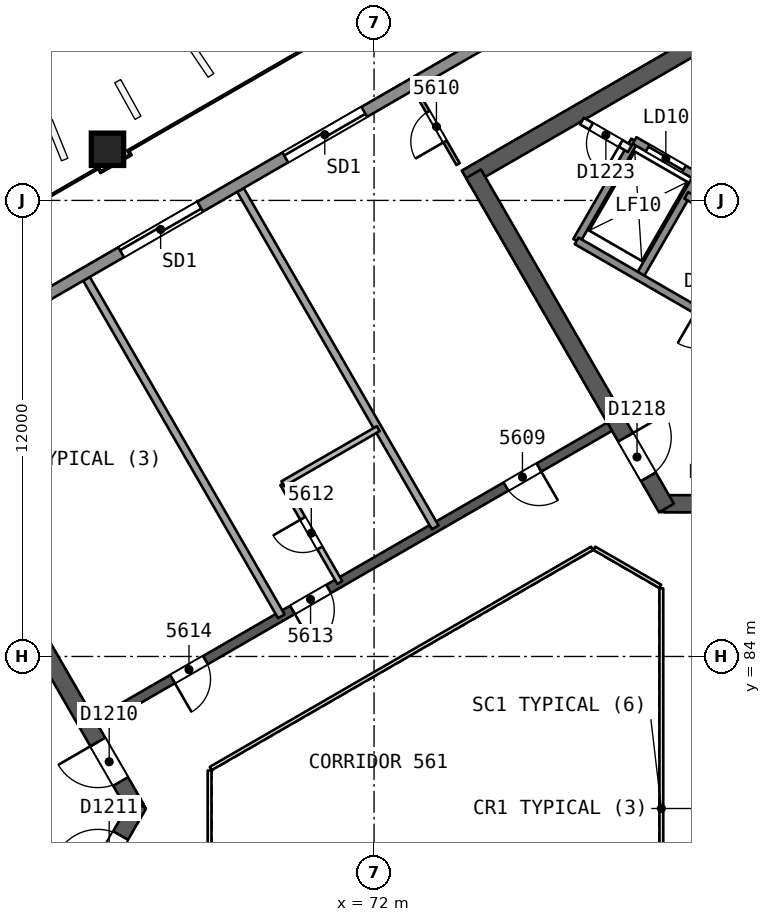
"""IFC4 building model, lengths in metres.
Left out: names, types, materials, properties, quantities, classifications, styles, units other than length and angle.
Written with IfcOpenShell. Run it as: python <this file> out.ifc"""

import sys

from ifc_helpers import new_model, si_unit, direction, frame, frame_2d, origin, origin_2d, place, context, subcontext, project, spatial, rectangle, extrude, element, fill, save


model = new_model("IFC4")
c1 = context("Model", 3, precision=1e-05, world=origin(), true_north=direction((0.0, 1.0)))
c2 = subcontext(c1, "Body", "Model", "MODEL_VIEW")
j1 = project(units=[si_unit("LENGTHUNIT", "METRE"), si_unit("PLANEANGLEUNIT", "RADIAN")], contexts=[c1])
p1 = place(None, origin())
s1 = spatial("IfcSite", under=j1, at=p1, CompositionType="ELEMENT")
p2 = place(p1, origin())
s2 = spatial("IfcBuilding", under=s1, at=p2, CompositionType="ELEMENT")
p3 = place(p2, frame((0.0, 0.0, 228.0)))
s3 = spatial("IfcBuildingStorey", under=s2, at=p3, CompositionType="ELEMENT", Elevation=228.0)
p4 = place(p3, frame((65.74, 80.0, 0.0), z_axis=(0.0, 0.0, 1.0), x_axis=(-0.499991857942, 0.866030104553, 0.0)))
e1 = element("IfcWall", 1, at=p4, inside=s3, PredefinedType="SHEAR", context=c2, shape_type="SweptSolid", body=[
    extrude(rectangle(XDim=10.25, YDim=0.45, at=frame_2d((5.125, 0.0))), origin(), (0.0, 0.0, 1.0), 3.7),
])
p5 = place(p4, frame((0.82, 0.0, 0.0)))
e2 = element("IfcOpeningElement", 2, at=p5, cuts=e1, PredefinedType="OPENING", context=c2, shape_type="SweptSolid", body=[
    extrude(rectangle(XDim=1.2, YDim=2.1, at=frame_2d((0.6, 1.05))), frame((0.0, 0.235, 0.0), z_axis=(0.0, -1.0, 0.0), x_axis=(1.0, 0.0, 0.0)), (0.0, 0.0, 1.0), 0.471),
])
p6 = place(p3, frame((60.728, 71.318, 0.0), z_axis=(0.0, 0.0, 1.0), x_axis=(0.500012416173, 0.866018235185, 0.0)))
e3 = element("IfcWall", 3, at=p6, inside=s3, PredefinedType="SHEAR", context=c2, shape_type="SweptSolid", body=[
    extrude(rectangle(XDim=10.155, YDim=0.45, at=frame_2d((5.078, 0.0))), origin(), (0.0, 0.0, 1.0), 3.7),
])
p7 = place(p6, frame((8.005, 0.0, 0.0)))
e4 = element("IfcOpeningElement", 4, at=p7, cuts=e3, PredefinedType="OPENING", context=c2, shape_type="SweptSolid", body=[
    extrude(rectangle(XDim=1.2, YDim=2.1, at=frame_2d((0.6, 1.05))), frame((0.0, 0.235, 0.0), z_axis=(0.0, -1.0, 0.0), x_axis=(1.0, 0.0, 0.0)), (0.0, 0.0, 1.0), 0.471),
])
p8 = place(p3, frame((79.63, 88.019, 0.0), z_axis=(0.0, 0.0, 1.0), x_axis=(1.0, 0.0, 0.0)))
e5 = element("IfcWall", 5, at=p8, inside=s3, PredefinedType="SHEAR", context=c2, shape_type="SweptSolid", body=[
    extrude(rectangle(XDim=10.25, YDim=0.45, at=frame_2d((5.125, 0.0))), origin(), (0.0, 0.0, 1.0), 3.7),
])
p9 = place(p8, frame((0.82, 0.0, 0.0)))
e6 = element("IfcOpeningElement", 6, at=p9, cuts=e5, PredefinedType="OPENING", context=c2, shape_type="SweptSolid", body=[
    extrude(rectangle(XDim=1.2, YDim=2.1, at=frame_2d((0.6, 1.05))), frame((0.0, 0.235, 0.0), z_axis=(0.0, -1.0, 0.0), x_axis=(1.0, 0.0, 0.0)), (0.0, 0.0, 1.0), 0.471),
])
p10 = place(p3, frame((86.723, 103.69, 0.0), z_axis=(0.0, 0.0, 1.0), x_axis=(-0.866022713978, -0.500004658852, 0.0)))
e7 = element("IfcWall", 7, at=p10, inside=s3, PredefinedType="SHEAR", context=c2, shape_type="SweptSolid", body=[
    extrude(rectangle(XDim=14.203, YDim=0.45, at=frame_2d((7.102, 0.0))), origin(), (0.0, 0.0, 1.0), 3.7),
])
p11 = place(p3, frame((74.617, 96.701, 0.0), z_axis=(0.0, 0.0, 1.0), x_axis=(0.499994385119, -0.866028645513, 0.0)))
e8 = element("IfcWall", 8, at=p11, inside=s3, PredefinedType="SHEAR", context=c2, shape_type="SweptSolid", body=[
    extrude(rectangle(XDim=10.155, YDim=0.45, at=frame_2d((5.077, 0.0))), origin(), (0.0, 0.0, 1.0), 3.7),
])
p12 = place(p11, frame((8.005, 0.0, 0.0)))
e9 = element("IfcOpeningElement", 9, at=p12, cuts=e8, PredefinedType="OPENING", context=c2, shape_type="SweptSolid", body=[
    extrude(rectangle(XDim=1.2, YDim=2.1, at=frame_2d((0.6, 1.05))), frame((0.0, 0.235, 0.0), z_axis=(0.0, -1.0, 0.0), x_axis=(1.0, 0.0, 0.0)), (0.0, 0.0, 1.0), 0.471),
])
p13 = place(p3, frame((78.2, 90.046, 0.0), z_axis=(0.0, 0.0, 1.0), x_axis=(-0.866026492143, -0.499998114903, 0.0)))
e10 = element("IfcWall", 10, at=p13, inside=s3, PredefinedType="SHEAR", context=c2, shape_type="SweptSolid", body=[
    extrude(rectangle(XDim=15.588, YDim=0.25, at=frame_2d((7.794, 0.0))), origin(), (0.0, 0.0, 1.0), 3.3),
])
p14 = place(p13, frame((2.15, 0.0, 0.0)))
e11 = element("IfcOpeningElement", 11, at=p14, cuts=e10, PredefinedType="OPENING", context=c2, shape_type="SweptSolid", body=[
    extrude(rectangle(XDim=1.0, YDim=2.1, at=frame_2d((0.5, 1.05))), frame((0.0, 0.135, 0.0), z_axis=(0.0, -1.0, 0.0), x_axis=(1.0, 0.0, 0.0)), (0.0, 0.0, 1.0), 0.271),
])
p15 = place(p13, frame((8.538, 0.0, 0.0)))
e12 = element("IfcOpeningElement", 12, at=p15, cuts=e10, PredefinedType="OPENING", context=c2, shape_type="SweptSolid", body=[
    extrude(rectangle(XDim=1.1, YDim=2.1, at=frame_2d((0.55, 1.05))), frame((0.0, 0.135, 0.0), z_axis=(0.0, -1.0, 0.0), x_axis=(1.0, 0.0, 0.0)), (0.0, 0.0, 1.0), 0.271),
])
p16 = place(p13, frame((12.282, 0.0, 0.0)))
e13 = element("IfcOpeningElement", 13, at=p16, cuts=e10, PredefinedType="OPENING", context=c2, shape_type="SweptSolid", body=[
    extrude(rectangle(XDim=1.0, YDim=2.1, at=frame_2d((0.5, 1.05))), frame((0.0, 0.135, 0.0), z_axis=(0.0, -1.0, 0.0), x_axis=(1.0, 0.0, 0.0)), (0.0, 0.0, 1.0), 0.271),
])
p17 = place(p3, frame((64.974, 97.366, 0.0), z_axis=(0.010093620709, -0.017482414954, 0.999796221231), x_axis=(-0.499891296978, 0.865852860014, 0.020187025823)))
e14 = element("IfcColumn", 14, at=p17, inside=s3, PredefinedType="COLUMN", context=c2, shape_type="SweptSolid", body=[
    extrude(rectangle(XDim=0.85, YDim=0.85, at=origin_2d()), origin(), (0.0, 0.0, 1.0), 3.701),
])
p18 = place(p3, frame((74.21, 96.956, 0.0), z_axis=(0.0, 0.0, 1.0), x_axis=(-0.499948534732, 0.866055115232, 0.0)))
e15 = element("IfcWall", 15, at=p18, inside=s3, PredefinedType="PARTITIONING", context=c2, shape_type="SweptSolid", body=[
    extrude(rectangle(XDim=2.275, YDim=0.1, at=frame_2d((1.137, 0.0))), origin(), (0.0, 0.0, 1.0), 3.3),
])
p19 = place(p18, frame((0.687, 0.0, 0.0)))
e16 = element("IfcOpeningElement", 16, at=p19, cuts=e15, PredefinedType="OPENING", context=c2, shape_type="SweptSolid", body=[
    extrude(rectangle(XDim=0.9, YDim=2.1, at=frame_2d((0.45, 1.05))), frame((0.0, 0.061, 0.0), z_axis=(0.0, -1.0, 0.0), x_axis=(1.0, 0.0, 0.0)), (0.0, 0.0, 1.0), 0.121),
])
p20 = place(p3, frame((68.483, 96.276, 0.0), z_axis=(0.0, 0.0, 1.0), x_axis=(0.500011000363, -0.866019052629, 0.0)))
e17 = element("IfcWall", 17, at=p20, inside=s3, PredefinedType="PARTITIONING", context=c2, shape_type="SweptSolid", body=[
    extrude(rectangle(XDim=10.254, YDim=0.2, at=frame_2d((5.127, 0.0))), origin(), (0.0, 0.0, 1.0), 3.3),
])
p21 = place(p3, frame((71.099, 85.946, 0.0), z_axis=(0.0, 0.0, 1.0), x_axis=(-0.499990139034, 0.866031096941, 0.0)))
e18 = element("IfcWall", 18, at=p21, inside=s3, PredefinedType="PARTITIONING", context=c2, shape_type="SweptSolid", body=[
    extrude(rectangle(XDim=3.0, YDim=0.15, at=frame_2d((1.5, 0.0))), origin(), (0.0, 0.0, 1.0), 3.3),
])
p22 = place(p21, frame((1.05, 0.0, 0.0)))
e19 = element("IfcOpeningElement", 19, at=p22, cuts=e18, PredefinedType="OPENING", context=c2, shape_type="SweptSolid", body=[
    extrude(rectangle(XDim=0.9, YDim=2.1, at=frame_2d((0.45, 1.05))), frame((0.0, 0.085, 0.0), z_axis=(0.0, -1.0, 0.0), x_axis=(1.0, 0.0, 0.0)), (0.0, 0.0, 1.0), 0.171),
])
p23 = place(p3, frame((69.599, 88.544, 0.0), z_axis=(0.0, 0.0, 1.0), x_axis=(0.866032775405, 0.499987231761, 0.0)))
e20 = element("IfcWall", 20, at=p23, inside=s3, PredefinedType="PARTITIONING", context=c2, shape_type="SweptSolid", body=[
    extrude(rectangle(XDim=2.9, YDim=0.15, at=frame_2d((1.45, 0.0))), origin(), (0.0, 0.0, 1.0), 3.3),
])
p24 = place(p3, frame((64.433, 93.938, 0.0), z_axis=(0.0, 0.0, 1.0), x_axis=(0.500011000363, -0.866019052629, 0.0)))
e21 = element("IfcWall", 21, at=p24, inside=s3, PredefinedType="PARTITIONING", context=c2, shape_type="SweptSolid", body=[
    extrude(rectangle(XDim=10.254, YDim=0.2, at=frame_2d((5.127, 0.0))), origin(), (0.0, 0.0, 1.0), 3.3),
])
p25 = place(p3, frame((44.454, 82.574, 0.0), z_axis=(0.0, 0.0, 1.0), x_axis=(0.86602387423, 0.500002649256, 0.0)))
e22 = element("IfcWall", 22, at=p25, inside=s3, PredefinedType="SOLIDWALL", context=c2, shape_type="SweptSolid", body=[
    extrude(rectangle(XDim=50.333, YDim=0.3, at=frame_2d((25.167, 0.0))), origin(), (0.0, 0.0, 1.0), 3.3),
])
p26 = place(p25, frame((24.122, 0.0, 0.0)))
e23 = element("IfcOpeningElement", 23, at=p26, cuts=e22, PredefinedType="OPENING", context=c2, shape_type="SweptSolid", body=[
    extrude(rectangle(XDim=2.4, YDim=2.4, at=frame_2d((1.2, 1.2))), frame((0.0, 0.161, 0.0), z_axis=(0.0, -1.0, 0.0), x_axis=(1.0, 0.0, 0.0)), (0.0, 0.0, 1.0), 0.321),
])
p27 = place(p25, frame((29.111, 0.0, 0.0)))
e24 = element("IfcOpeningElement", 24, at=p27, cuts=e22, PredefinedType="OPENING", context=c2, shape_type="SweptSolid", body=[
    extrude(rectangle(XDim=2.4, YDim=2.4, at=frame_2d((1.2, 1.2))), frame((0.0, 0.161, 0.0), z_axis=(0.0, -1.0, 0.0), x_axis=(1.0, 0.0, 0.0)), (0.0, 0.0, 1.0), 0.321),
])
p28 = place(p25, frame((39.164, 0.0, 0.0)))
e25 = element("IfcOpeningElement", 25, at=p28, cuts=e22, PredefinedType="OPENING", context=c2, shape_type="SweptSolid", body=[
    extrude(rectangle(XDim=2.4, YDim=2.4, at=frame_2d((1.2, 1.2))), frame((0.0, 0.161, 0.0), z_axis=(0.0, -1.0, 0.0), x_axis=(1.0, 0.0, 0.0)), (0.0, 0.0, 1.0), 0.321),
])
p29 = place(p25, frame((18.978, 0.0, 0.0)))
e26 = element("IfcOpeningElement", 26, at=p29, cuts=e22, PredefinedType="OPENING", context=c2, shape_type="SweptSolid", body=[
    extrude(rectangle(XDim=2.4, YDim=2.4, at=frame_2d((1.2, 1.2))), frame((0.0, 0.161, 0.0), z_axis=(0.0, -1.0, 0.0), x_axis=(1.0, 0.0, 0.0)), (0.0, 0.0, 1.0), 0.321),
])
p30 = place(p25, frame((8.763, 0.0, 0.0)))
e27 = element("IfcOpeningElement", 27, at=p30, cuts=e22, PredefinedType="OPENING", context=c2, shape_type="SweptSolid", body=[
    extrude(rectangle(XDim=2.4, YDim=2.4, at=frame_2d((1.2, 1.2))), frame((0.0, 0.161, 0.0), z_axis=(0.0, -1.0, 0.0), x_axis=(1.0, 0.0, 0.0)), (0.0, 0.0, 1.0), 0.321),
])
for number, where, z_axis, x_axis in (
    (28, (78.976, 93.986, 0.0), (0.0, 0.0, 1.0), (0.5, 0.866, 0.0)),
    (29, (77.33, 94.936, 0.0), (0.0, 0.0, 1.0), (0.5, 0.866, 0.0)),
):
    element("IfcWall", number, at=place(p3, frame(where, z_axis=z_axis, x_axis=x_axis)), inside=s3, PredefinedType="SOLIDWALL", context=c2, shape_type="SweptSolid", body=[
        extrude(rectangle(XDim=3.05, YDim=0.2, at=frame_2d((1.525, 0.0))), origin(), (0.0, 0.0, 1.0), 3.3),
    ])
p31 = place(p3, frame((86.77, 89.486, 0.0), z_axis=(0.0, 0.0, 1.0), x_axis=(-0.86601811187, 0.500012629753, 0.0)))
e30 = element("IfcWall", 30, at=p31, inside=s3, PredefinedType="SOLIDWALL", context=c2, shape_type="SweptSolid", body=[
    extrude(rectangle(XDim=10.9, YDim=0.2, at=frame_2d((5.45, 0.0))), origin(), (0.0, 0.0, 1.0), 3.3),
])
p32 = place(p31, frame((0.625, 0.0, 0.0)))
e31 = element("IfcOpeningElement", 31, at=p32, cuts=e30, PredefinedType="OPENING", context=c2, shape_type="SweptSolid", body=[
    extrude(rectangle(XDim=1.0, YDim=2.1, at=frame_2d((0.5, 1.05))), frame((0.0, 0.11, 0.0), z_axis=(0.0, -1.0, 0.0), x_axis=(1.0, 0.0, 0.0)), (0.0, 0.0, 1.0), 0.221),
])
p33 = place(p31, frame((2.875, 0.0, 0.0)))
e32 = element("IfcOpeningElement", 32, at=p33, cuts=e30, PredefinedType="OPENING", context=c2, shape_type="SweptSolid", body=[
    extrude(rectangle(XDim=1.0, YDim=2.1, at=frame_2d((0.5, 1.05))), frame((0.0, 0.11, 0.0), z_axis=(0.0, -1.0, 0.0), x_axis=(1.0, 0.0, 0.0)), (0.0, 0.0, 1.0), 0.221),
])
p34 = place(p31, frame((6.25, 0.0, 0.0)))
e33 = element("IfcOpeningElement", 33, at=p34, cuts=e30, PredefinedType="OPENING", context=c2, shape_type="SweptSolid", body=[
    extrude(rectangle(XDim=1.0, YDim=2.1, at=frame_2d((0.5, 1.05))), frame((0.0, 0.11, 0.0), z_axis=(0.0, -1.0, 0.0), x_axis=(1.0, 0.0, 0.0)), (0.0, 0.0, 1.0), 0.221),
])
p35 = place(p3, frame((89.43, 90.814, 0.0), z_axis=(0.0, 0.0, 1.0), x_axis=(-0.866018983788, 0.500011119594, 0.0)))
e34 = element("IfcWall", 34, at=p35, inside=s3, PredefinedType="SOLIDWALL", context=c2, shape_type="SweptSolid", body=[
    extrude(rectangle(XDim=10.64, YDim=0.2, at=frame_2d((5.32, 0.0))), origin(), (0.0, 0.0, 1.0), 3.3),
])
p36 = place(p35, frame((0.37, 0.0, 0.0)))
e35 = element("IfcOpeningElement", 35, at=p36, cuts=e34, PredefinedType="OPENING", context=c2, shape_type="SweptSolid", body=[
    extrude(rectangle(XDim=0.9, YDim=2.1, at=frame_2d((0.45, 1.05))), frame((0.0, 0.11, 0.0), z_axis=(0.0, -1.0, 0.0), x_axis=(1.0, 0.0, 0.0)), (0.0, 0.0, 1.0), 0.221),
])
p37 = place(p3, frame((78.73, 97.361, 0.0), z_axis=(0.0, 0.0, 1.0), x_axis=(-0.866045896294, 0.499964504253, 0.0)))
e36 = element("IfcWall", 36, at=p37, inside=s3, PredefinedType="PARTITIONING", context=c2, shape_type="SweptSolid", body=[
    extrude(rectangle(XDim=1.455, YDim=0.2, at=frame_2d((0.728, 0.0))), origin(), (0.0, 0.0, 1.0), 3.3),
])
p38 = place(p37, frame((0.278, 0.0, 0.0)))
e37 = element("IfcOpeningElement", 37, at=p38, cuts=e36, PredefinedType="OPENING", context=c2, shape_type="SweptSolid", body=[
    extrude(rectangle(XDim=0.9, YDim=2.1, at=frame_2d((0.45, 1.05))), frame((0.0, 0.11, 0.0), z_axis=(0.0, -1.0, 0.0), x_axis=(1.0, 0.0, 0.0)), (0.0, 0.0, 1.0), 0.221),
])
p39 = place(p3, frame((80.5, 96.627, 0.0), z_axis=(0.0, 0.0, 1.0), x_axis=(-0.86601224135, 0.500022797313, 0.0)))
e38 = element("IfcWall", 38, at=p39, inside=s3, PredefinedType="SOLIDWALL", context=c2, shape_type="SweptSolid", body=[
    extrude(rectangle(XDim=1.9, YDim=0.2, at=frame_2d((0.95, 0.0))), origin(), (0.0, 0.0, 1.0), 3.3),
])
p40 = place(p39, frame((0.4, 0.0, 0.0)))
e39 = element("IfcOpeningElement", 39, at=p40, cuts=e38, PredefinedType="OPENING", context=c2, shape_type="SweptSolid", body=[
    extrude(rectangle(XDim=1.1, YDim=2.1, at=frame_2d((0.55, 1.05))), frame((0.0, 0.11, 0.0), z_axis=(0.0, -1.0, 0.0), x_axis=(1.0, 0.0, 0.0)), (0.0, 0.0, 1.0), 0.221),
])
p41 = place(p3, frame((79.56, 74.206, 0.0), z_axis=(0.0, 0.0, 1.0), x_axis=(0.0, 1.0, 0.0)))
e40 = element("IfcWall", 40, at=p41, inside=s3, PredefinedType="PARTITIONING", context=c2, shape_type="SweptSolid", body=[
    extrude(rectangle(XDim=11.588, YDim=0.1, at=frame_2d((5.794, 0.0))), origin(), (0.0, 0.0, 1.0), 3.3),
])
p42 = place(p3, frame((79.53, 85.846, 0.0), z_axis=(0.0, 0.0, 1.0), x_axis=(-0.866041268327, 0.499972520799, 0.0)))
e41 = element("IfcWall", 41, at=p42, inside=s3, PredefinedType="PARTITIONING", context=c2, shape_type="SweptSolid", body=[
    extrude(rectangle(XDim=2.0, YDim=0.1, at=frame_2d((1.0, 0.0))), origin(), (0.0, 0.0, 1.0), 3.3),
])
p43 = place(p3, frame((77.738, 86.846, 0.0), z_axis=(0.0, 0.0, 1.0), x_axis=(-0.866026658274, -0.499997827154, 0.0)))
e42 = element("IfcWall", 42, at=p43, inside=s3, PredefinedType="PARTITIONING", context=c2, shape_type="SweptSolid", body=[
    extrude(rectangle(XDim=11.588, YDim=0.1, at=frame_2d((5.794, 0.0))), origin(), (0.0, 0.0, 1.0), 3.3),
])
p44 = place(p3, frame((67.672, 81.0, 0.0), z_axis=(0.0, 0.0, 1.0), x_axis=(0.0, -1.0, 0.0)))
e43 = element("IfcWall", 43, at=p44, inside=s3, PredefinedType="PARTITIONING", context=c2, shape_type="SweptSolid", body=[
    extrude(rectangle(XDim=2.0, YDim=0.1, at=frame_2d((1.0, 0.0))), origin(), (0.0, 0.0, 1.0), 3.3),
])
p45 = place(p14, origin())
e44 = element("IfcDoor", 44, at=p45, inside=s3, OperationType="SINGLE_SWING_LEFT", PredefinedType="NOTDEFINED", context=c2, shape_type="SweptSolid", body=[
    extrude(rectangle(XDim=1.0, YDim=2.1, at=frame_2d((0.5, 1.05))), frame((0.0, 0.025, 0.0), z_axis=(0.0, -1.0, 0.0), x_axis=(1.0, 0.0, 0.0)), (0.0, 0.0, 1.0), 0.05),
])
fill(e11, e44)
p46 = place(p19, origin())
e45 = element("IfcDoor", 45, at=p46, inside=s3, OperationType="SINGLE_SWING_LEFT", PredefinedType="NOTDEFINED", context=c2, shape_type="SweptSolid", body=[
    extrude(rectangle(XDim=0.9, YDim=2.1, at=frame_2d((0.45, 1.05))), frame((0.0, 0.025, 0.0), z_axis=(0.0, -1.0, 0.0), x_axis=(1.0, 0.0, 0.0)), (0.0, 0.0, 1.0), 0.05),
])
fill(e16, e45)
p47 = place(p22, origin())
e46 = element("IfcDoor", 46, at=p47, inside=s3, OperationType="SINGLE_SWING_RIGHT", PredefinedType="NOTDEFINED", context=c2, shape_type="SweptSolid", body=[
    extrude(rectangle(XDim=0.9, YDim=2.1, at=frame_2d((0.45, 1.05))), frame((0.0, 0.025, 0.0), z_axis=(0.0, -1.0, 0.0), x_axis=(1.0, 0.0, 0.0)), (0.0, 0.0, 1.0), 0.05),
])
fill(e19, e46)
p48 = place(p15, origin())
e47 = element("IfcDoor", 47, at=p48, inside=s3, OperationType="SINGLE_SWING_RIGHT", PredefinedType="NOTDEFINED", context=c2, shape_type="SweptSolid", body=[
    extrude(rectangle(XDim=1.1, YDim=2.1, at=frame_2d((0.55, 1.05))), frame((0.0, 0.025, 0.0), z_axis=(0.0, -1.0, 0.0), x_axis=(1.0, 0.0, 0.0)), (0.0, 0.0, 1.0), 0.05),
])
fill(e12, e47)
p49 = place(p16, origin())
e48 = element("IfcDoor", 48, at=p49, inside=s3, OperationType="SINGLE_SWING_RIGHT", PredefinedType="NOTDEFINED", context=c2, shape_type="SweptSolid", body=[
    extrude(rectangle(XDim=1.0, YDim=2.1, at=frame_2d((0.5, 1.05))), frame((0.0, 0.025, 0.0), z_axis=(0.0, -1.0, 0.0), x_axis=(1.0, 0.0, 0.0)), (0.0, 0.0, 1.0), 0.05),
])
fill(e13, e48)
p50 = place(p26, origin())
e49 = element("IfcDoor", 49, at=p50, inside=s3, OperationType="SLIDING_TO_LEFT", PredefinedType="NOTDEFINED", context=c2, shape_type="SweptSolid", body=[
    extrude(rectangle(XDim=2.4, YDim=2.4, at=frame_2d((1.2, 1.2))), frame((0.0, 0.025, 0.0), z_axis=(0.0, -1.0, 0.0), x_axis=(1.0, 0.0, 0.0)), (0.0, 0.0, 1.0), 0.05),
])
fill(e23, e49)
p51 = place(p27, origin())
e50 = element("IfcDoor", 50, at=p51, inside=s3, OperationType="SLIDING_TO_RIGHT", PredefinedType="NOTDEFINED", context=c2, shape_type="SweptSolid", body=[
    extrude(rectangle(XDim=2.4, YDim=2.4, at=frame_2d((1.2, 1.2))), frame((0.0, 0.025, 0.0), z_axis=(0.0, -1.0, 0.0), x_axis=(1.0, 0.0, 0.0)), (0.0, 0.0, 1.0), 0.05),
])
fill(e24, e50)
p52 = place(p5, origin())
e51 = element("IfcDoor", 51, at=p52, inside=s3, OperationType="SINGLE_SWING_RIGHT", PredefinedType="NOTDEFINED", context=c2, shape_type="SweptSolid", body=[
    extrude(rectangle(XDim=1.2, YDim=2.1, at=frame_2d((0.6, 1.05))), frame((0.0, 0.025, 0.0), z_axis=(0.0, -1.0, 0.0), x_axis=(1.0, 0.0, 0.0)), (0.0, 0.0, 1.0), 0.05),
])
fill(e2, e51)
p53 = place(p7, origin())
e52 = element("IfcDoor", 52, at=p53, inside=s3, OperationType="SINGLE_SWING_LEFT", PredefinedType="NOTDEFINED", context=c2, shape_type="SweptSolid", body=[
    extrude(rectangle(XDim=1.2, YDim=2.1, at=frame_2d((0.6, 1.05))), frame((0.0, 0.025, 0.0), z_axis=(0.0, -1.0, 0.0), x_axis=(1.0, 0.0, 0.0)), (0.0, 0.0, 1.0), 0.05),
])
fill(e4, e52)
p54 = place(p12, origin())
e53 = element("IfcDoor", 53, at=p54, inside=s3, OperationType="SINGLE_SWING_LEFT", PredefinedType="NOTDEFINED", context=c2, shape_type="SweptSolid", body=[
    extrude(rectangle(XDim=1.2, YDim=2.1, at=frame_2d((0.6, 1.05))), frame((0.0, 0.025, 0.0), z_axis=(0.0, -1.0, 0.0), x_axis=(1.0, 0.0, 0.0)), (0.0, 0.0, 1.0), 0.05),
])
fill(e9, e53)
p55 = place(p40, origin())
e54 = element("IfcDoor", 54, at=p55, inside=s3, OperationType="SLIDING_TO_RIGHT", PredefinedType="NOTDEFINED", context=c2, shape_type="SweptSolid", body=[
    extrude(rectangle(XDim=1.1, YDim=2.1, at=frame_2d((0.55, 1.05))), frame((0.0, 0.025, 0.0), z_axis=(0.0, -1.0, 0.0), x_axis=(1.0, 0.0, 0.0)), (0.0, 0.0, 1.0), 0.05),
])
fill(e39, e54)
p56 = place(p38, origin())
e55 = element("IfcDoor", 55, at=p56, inside=s3, OperationType="SINGLE_SWING_LEFT", PredefinedType="NOTDEFINED", context=c2, shape_type="SweptSolid", body=[
    extrude(rectangle(XDim=0.9, YDim=2.1, at=frame_2d((0.45, 1.05))), frame((0.0, 0.025, 0.0), z_axis=(0.0, -1.0, 0.0), x_axis=(1.0, 0.0, 0.0)), (0.0, 0.0, 1.0), 0.05),
])
fill(e37, e55)
save(model, sys.argv[1])
